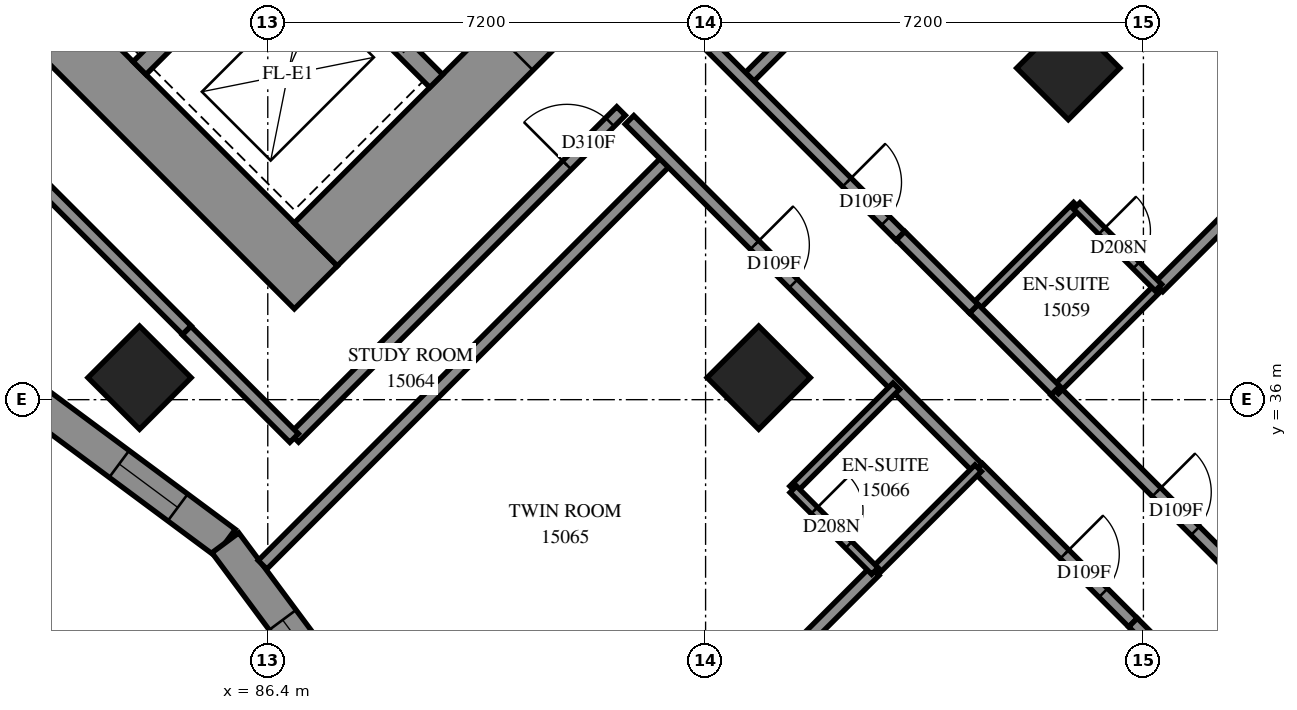
"""IFC4 building model, lengths in metres.
Left out: names, types, materials, properties, quantities, classifications, styles, units other than length and angle.
Written with IfcOpenShell. Run it as: python <this file> out.ifc"""

import sys

from ifc_helpers import new_model, si_unit, direction, frame, frame_2d, origin, origin_2d, place, context, subcontext, project, spatial, polyline, rectangle, outline, extrude, element, fill, save


model = new_model("IFC4")
c1 = context("Model", 3, precision=1e-05, world=origin(), true_north=direction((0.0, 1.0)))
c2 = subcontext(c1, "Body", "Model", "MODEL_VIEW")
j1 = project(units=[si_unit("LENGTHUNIT", "METRE"), si_unit("PLANEANGLEUNIT", "RADIAN")], contexts=[c1])
p1 = place(None, origin())
s1 = spatial("IfcSite", under=j1, at=p1, CompositionType="ELEMENT")
p2 = place(p1, origin())
s2 = spatial("IfcBuilding", under=s1, at=p2, CompositionType="ELEMENT")
p3 = place(p2, frame((0.0, 0.0, 57.6)))
s3 = spatial("IfcBuildingStorey", under=s2, at=p3, CompositionType="ELEMENT", Elevation=57.6)
for number, where, z_axis, x_axis in (
    (1, (84.291, 36.362, 0.0), (0.0, 0.0, 1.0), (0.707, -0.707, 0.0)),
    (2, (99.565, 41.453, 0.0), (0.0, 0.0, 1.0), (0.707, -0.707, 0.0)),
    (3, (94.474, 36.362, 0.0), (0.0, 0.0, 1.0), (0.707, -0.707, 0.0)),
):
    element("IfcColumn", number, at=place(p3, frame(where, z_axis=z_axis, x_axis=x_axis)), inside=s3, PredefinedType="COLUMN", context=c2, shape_type="SweptSolid", body=[
        extrude(rectangle(XDim=1.2, YDim=1.2, at=origin_2d()), origin(), (0.0, 0.0, 1.0), 3.1),
    ])
p4 = place(p3, frame((75.594, 49.443, -0.3), z_axis=(0.0, 0.0, 1.0), x_axis=(0.7071037324, -0.70710983, 0.0)))
e4 = element("IfcWall", 4, at=p4, inside=s3, PredefinedType="SHEAR", context=c2, shape_type="SweptSolid", body=[
    extrude(rectangle(XDim=16.4, YDim=1.0, at=frame_2d((8.2, 0.0))), origin(), (0.0, 0.0, 1.0), 2.7),
])
p5 = place(p3, frame((87.19, 38.554, -0.3), z_axis=(0.0, 0.0, 1.0), x_axis=(0.707103309, 0.7071102534, 0.0)))
e5 = element("IfcWall", 5, at=p5, inside=s3, PredefinedType="SHEAR", context=c2, shape_type="SweptSolid", body=[
    extrude(rectangle(XDim=14.4, YDim=1.0, at=frame_2d((7.2, 0.0))), origin(), (0.0, 0.0, 1.0), 2.7),
])
p6 = place(p5, frame((4.55, 0.0, 0.3)))
e6 = element("IfcOpeningElement", 6, at=p6, cuts=e5, PredefinedType="OPENING", context=c2, shape_type="SweptSolid", body=[
    extrude(rectangle(XDim=1.1, YDim=2.1, at=frame_2d((0.55, 1.05))), frame((0.0, 0.51, 0.0), z_axis=(0.0, -1.0, 0.0), x_axis=(1.0, 0.0, 0.0)), (0.0, 0.0, 1.0), 1.02),
])
p7 = place(p5, frame((11.35, 0.0, 0.3)))
e7 = element("IfcOpeningElement", 7, at=p7, cuts=e5, PredefinedType="OPENING", context=c2, shape_type="SweptSolid", body=[
    extrude(rectangle(XDim=1.1, YDim=2.1, at=frame_2d((0.55, 1.05))), frame((0.0, 0.51, 0.0), z_axis=(0.0, -1.0, 0.0), x_axis=(1.0, 0.0, 0.0)), (0.0, 0.0, 1.0), 1.02),
])
p8 = place(p3, frame((84.291, 41.453, 0.0), z_axis=(0.0, 0.0, 1.0), x_axis=(0.7071067812, 0.7071067812, 0.0)))
e8 = element("IfcWall", 8, at=p8, inside=s3, PredefinedType="SOLIDWALL", context=c2, shape_type="SweptSolid", body=[
    extrude(rectangle(XDim=3.3, YDim=0.3, at=frame_2d((1.65, 0.0))), origin(), (0.0, 0.0, 1.0), 3.1),
])
p9 = place(p3, frame((78.988, 51.423, 0.0), z_axis=(0.0, 0.0, 1.0), x_axis=(0.7071067812, -0.7071067812, 0.0)))
e9 = element("IfcWall", 9, at=p9, inside=s3, PredefinedType="SOLIDWALL", context=c2, shape_type="SweptSolid", body=[
    extrude(rectangle(XDim=14.4, YDim=0.3, at=frame_2d((7.2, 0.0))), origin(), (0.0, 0.0, 1.0), 3.1),
])
p10 = place(p9, frame((1.25, 0.0, 0.0)))
e10 = element("IfcOpeningElement", 10, at=p10, cuts=e9, PredefinedType="OPENING", context=c2, shape_type="SweptSolid", body=[
    extrude(rectangle(XDim=1.1, YDim=2.1, at=frame_2d((0.55, 1.05))), frame((0.0, 0.16, 0.0), z_axis=(0.0, -1.0, 0.0), x_axis=(1.0, 0.0, 0.0)), (0.0, 0.0, 1.0), 0.32),
])
p11 = place(p9, frame((4.85, 0.0, 0.0)))
e11 = element("IfcOpeningElement", 11, at=p11, cuts=e9, PredefinedType="OPENING", context=c2, shape_type="SweptSolid", body=[
    extrude(rectangle(XDim=1.1, YDim=2.1, at=frame_2d((0.55, 1.05))), frame((0.0, 0.16, 0.0), z_axis=(0.0, -1.0, 0.0), x_axis=(1.0, 0.0, 0.0)), (0.0, 0.0, 1.0), 0.32),
])
p12 = place(p9, frame((8.45, 0.0, 0.0)))
e12 = element("IfcOpeningElement", 12, at=p12, cuts=e9, PredefinedType="OPENING", context=c2, shape_type="SweptSolid", body=[
    extrude(rectangle(XDim=1.1, YDim=2.1, at=frame_2d((0.55, 1.05))), frame((0.0, 0.16, 0.0), z_axis=(0.0, -1.0, 0.0), x_axis=(1.0, 0.0, 0.0)), (0.0, 0.0, 1.0), 0.32),
])
p13 = place(p9, frame((12.05, 0.0, 0.0)))
e13 = element("IfcOpeningElement", 13, at=p13, cuts=e9, PredefinedType="OPENING", context=c2, shape_type="SweptSolid", body=[
    extrude(rectangle(XDim=1.1, YDim=2.1, at=frame_2d((0.55, 1.05))), frame((0.0, 0.16, 0.0), z_axis=(0.0, -1.0, 0.0), x_axis=(1.0, 0.0, 0.0)), (0.0, 0.0, 1.0), 0.32),
])
p14 = place(p3, frame((82.563, 35.977, 0.0), z_axis=(0.0, 0.0, 1.0), x_axis=(0.8029207709, -0.596085762, 0.0)))
e14 = element("IfcWall", 14, at=p14, inside=s3, PredefinedType="SOLIDWALL", context=c2, shape_type="SweptSolid", body=[
    extrude(outline(polyline([(-0.041, -0.275), (3.87, -0.275), (3.951, 0.275), (0.041, 0.275), (-0.041, -0.275)])), origin(), (0.0, 0.0, 1.0), 3.1),
])
p15 = place(p14, frame((1.736, 0.0, 0.5)))
e15 = element("IfcOpeningElement", 15, at=p15, cuts=e14, PredefinedType="OPENING", context=c2, shape_type="SweptSolid", body=[
    extrude(rectangle(XDim=1.2, YDim=2.45, at=frame_2d((0.6, 1.225))), frame((0.0, 0.285, 0.0), z_axis=(0.0, -1.0, 0.0), x_axis=(1.0, 0.0, 0.0)), (0.0, 0.0, 1.0), 0.57),
])
p16 = place(p3, frame((85.703, 33.646, 0.0), z_axis=(0.0, 0.0, 1.0), x_axis=(0.596085762, -0.8029207709, 0.0)))
e16 = element("IfcWall", 16, at=p16, inside=s3, PredefinedType="SOLIDWALL", context=c2, shape_type="SweptSolid", body=[
    extrude(outline(polyline([(0.041, -0.275), (3.951, -0.275), (3.87, 0.275), (-0.041, 0.275), (0.041, -0.275)])), origin(), (0.0, 0.0, 1.0), 3.1),
])
p17 = place(p16, frame((1.58, 0.0, 0.5)))
e17 = element("IfcOpeningElement", 17, at=p17, cuts=e16, PredefinedType="OPENING", context=c2, shape_type="SweptSolid", body=[
    extrude(rectangle(XDim=1.2, YDim=2.45, at=frame_2d((0.6, 1.225))), frame((0.0, 0.285, 0.0), z_axis=(0.0, -1.0, 0.0), x_axis=(1.0, 0.0, 0.0)), (0.0, 0.0, 1.0), 0.57),
])
p18 = place(p3, frame((94.259, 41.243, 0.0), z_axis=(0.0, 0.0, 1.0), x_axis=(0.7070203602, 0.7071931916, 0.0)))
e18 = element("IfcWall", 18, at=p18, inside=s3, PredefinedType="PARTITIONING", context=c2, shape_type="SweptSolid", body=[
    extrude(rectangle(XDim=12.151, YDim=0.2, at=frame_2d((6.075, 0.0))), origin(), (0.0, 0.0, 1.0), 3.1),
])
p19 = place(p3, frame((101.049, 37.847, 0.0), z_axis=(0.0, 0.0, 1.0), x_axis=(0.7071067812, 0.7071067812, 0.0)))
e19 = element("IfcWall", 19, at=p19, inside=s3, PredefinedType="PARTITIONING", context=c2, shape_type="SweptSolid", body=[
    extrude(rectangle(XDim=9.806, YDim=0.2, at=frame_2d((4.903, 0.0))), origin(), (0.0, 0.0, 1.0), 3.1),
])
p20 = place(p3, frame((86.314, 33.285, 0.0), z_axis=(0.0, 0.0, 1.0), x_axis=(0.7069956063, 0.7072179386, 0.0)))
e20 = element("IfcWall", 20, at=p20, inside=s3, PredefinedType="PARTITIONING", context=c2, shape_type="SweptSolid", body=[
    extrude(rectangle(XDim=9.445, YDim=0.2, at=frame_2d((4.723, 0.0))), origin(), (0.0, 0.0, 1.0), 3.1),
])
p21 = place(p3, frame((92.349, 40.601, 0.0), z_axis=(0.0, 0.0, 1.0), x_axis=(0.7071067812, -0.7071067812, 0.0)))
e21 = element("IfcWall", 21, at=p21, inside=s3, PredefinedType="PARTITIONING", context=c2, shape_type="SweptSolid", body=[
    extrude(rectangle(XDim=8.101, YDim=0.2, at=frame_2d((4.05, 0.0))), origin(), (0.0, 0.0, 1.0), 3.1),
])
p22 = place(p21, frame((2.909, 0.0, 0.0)))
e22 = element("IfcOpeningElement", 22, at=p22, cuts=e21, PredefinedType="OPENING", context=c2, shape_type="SweptSolid", body=[
    extrude(rectangle(XDim=0.9, YDim=2.1, at=frame_2d((0.45, 1.05))), frame((0.0, 0.11, 0.0), z_axis=(0.0, -1.0, 0.0), x_axis=(1.0, 0.0, 0.0)), (0.0, 0.0, 1.0), 0.22),
])
p23 = place(p3, frame((86.836, 35.372, 0.0), z_axis=(0.0, 0.0, 1.0), x_axis=(0.7071067812, 0.7071067812, 0.0)))
e23 = element("IfcWall", 23, at=p23, inside=s3, PredefinedType="PARTITIONING", context=c2, shape_type="SweptSolid", body=[
    extrude(rectangle(XDim=7.6, YDim=0.2, at=frame_2d((3.8, 0.0))), origin(), (0.0, 0.0, 1.0), 3.1),
])
p24 = place(p23, frame((6.342, 0.0, 0.0)))
e24 = element("IfcOpeningElement", 24, at=p24, cuts=e23, PredefinedType="OPENING", context=c2, shape_type="SweptSolid", body=[
    extrude(rectangle(XDim=1.0, YDim=2.1, at=frame_2d((0.5, 1.05))), frame((0.0, 0.11, 0.0), z_axis=(0.0, -1.0, 0.0), x_axis=(1.0, 0.0, 0.0)), (0.0, 0.0, 1.0), 0.22),
])
p25 = place(p3, frame((99.349, 36.147, 0.0), z_axis=(0.0, 0.0, 1.0), x_axis=(0.7071067812, -0.7071067812, 0.0)))
e25 = element("IfcWall", 25, at=p25, inside=s3, PredefinedType="PARTITIONING", context=c2, shape_type="SweptSolid", body=[
    extrude(rectangle(XDim=7.201, YDim=0.2, at=frame_2d((3.601, 0.0))), origin(), (0.0, 0.0, 1.0), 3.1),
])
p26 = place(p25, frame((2.358, 0.0, 0.0)))
e26 = element("IfcOpeningElement", 26, at=p26, cuts=e25, PredefinedType="OPENING", context=c2, shape_type="SweptSolid", body=[
    extrude(rectangle(XDim=0.9, YDim=2.1, at=frame_2d((0.45, 1.05))), frame((0.0, 0.11, 0.0), z_axis=(0.0, -1.0, 0.0), x_axis=(1.0, 0.0, 0.0)), (0.0, 0.0, 1.0), 0.22),
])
p27 = place(p3, frame((91.457, 28.256, 0.0), z_axis=(0.0, 0.0, 1.0), x_axis=(0.7071067812, 0.7071067812, 0.0)))
e27 = element("IfcWall", 27, at=p27, inside=s3, PredefinedType="PARTITIONING", context=c2, shape_type="SweptSolid", body=[
    extrude(rectangle(XDim=6.965, YDim=0.2, at=frame_2d((3.482, 0.0))), origin(), (0.0, 0.0, 1.0), 3.1),
])
p28 = place(p3, frame((85.07, 37.142, 0.0), z_axis=(0.0, 0.0, 1.0), x_axis=(-0.7070899851, 0.7071235769, 0.0)))
e28 = element("IfcWall", 28, at=p28, inside=s3, PredefinedType="PARTITIONING", context=c2, shape_type="SweptSolid", body=[
    extrude(rectangle(XDim=5.954, YDim=0.2, at=frame_2d((2.977, 0.0))), origin(), (0.0, 0.0, 1.0), 3.1),
])
p29 = place(p3, frame((93.481, 42.015, 0.0), z_axis=(0.0, 0.0, 1.0), x_axis=(0.7071067812, -0.7071067812, 0.0)))
e29 = element("IfcWall", 29, at=p29, inside=s3, PredefinedType="PARTITIONING", context=c2, shape_type="SweptSolid", body=[
    extrude(rectangle(XDim=4.698, YDim=0.2, at=frame_2d((2.349, 0.0))), origin(), (0.0, 0.0, 1.0), 3.1),
])
p30 = place(p29, frame((3.452, 0.0, 0.0)))
e30 = element("IfcOpeningElement", 30, at=p30, cuts=e29, PredefinedType="OPENING", context=c2, shape_type="SweptSolid", body=[
    extrude(rectangle(XDim=0.9, YDim=2.1, at=frame_2d((0.45, 1.05))), frame((0.0, 0.11, 0.0), z_axis=(0.0, -1.0, 0.0), x_axis=(1.0, 0.0, 0.0)), (0.0, 0.0, 1.0), 0.22),
])
p31 = place(p3, frame((98.082, 34.879, 0.0), z_axis=(0.0, 0.0, 1.0), x_axis=(0.7073845681, -0.7068288851, 0.0)))
e31 = element("IfcWall", 31, at=p31, inside=s3, PredefinedType="PARTITIONING", context=c2, shape_type="SweptSolid", body=[
    extrude(rectangle(XDim=3.599, YDim=0.2, at=frame_2d((1.8, 0.0))), origin(), (0.0, 0.0, 1.0), 3.1),
])
p32 = place(p31, frame((2.009, 0.0, 0.0)))
e32 = element("IfcOpeningElement", 32, at=p32, cuts=e31, PredefinedType="OPENING", context=c2, shape_type="SweptSolid", body=[
    extrude(rectangle(XDim=0.9, YDim=2.1, at=frame_2d((0.45, 1.05))), frame((0.0, 0.11, 0.0), z_axis=(0.0, -1.0, 0.0), x_axis=(1.0, 0.0, 0.0)), (0.0, 0.0, 1.0), 0.22),
])
p33 = place(p3, frame((85.065, 37.137, 0.0), z_axis=(0.0, 0.0, 1.0), x_axis=(0.7071067812, -0.7071067812, 0.0)))
e33 = element("IfcWall", 33, at=p33, inside=s3, PredefinedType="PARTITIONING", context=c2, shape_type="SweptSolid", body=[
    extrude(rectangle(XDim=2.5, YDim=0.2, at=frame_2d((1.25, 0.0))), origin(), (0.0, 0.0, 1.0), 3.1),
])
for number, where, z_axis, x_axis in (
    (34, (96.384, 33.178, 0.0), (0.0, 0.0, 1.0), (0.708, 0.707, 0.0)),
    (35, (99.349, 36.153, 0.0), (0.0, 0.0, 1.0), (0.708, 0.707, 0.0)),
):
    element("IfcWall", number, at=place(p3, frame(where, z_axis=z_axis, x_axis=x_axis)), inside=s3, PredefinedType="PARTITIONING", context=c2, shape_type="SweptSolid", body=[
        extrude(rectangle(XDim=2.4, YDim=0.15, at=frame_2d((1.2, 0.0))), origin(), (0.0, 0.0, 1.0), 3.1),
    ])
for number, where, z_axis, x_axis in (
    (36, (95.039, 34.525, 0.0), (0.0, 0.0, 1.0), (0.707, 0.707, 0.0)),
    (37, (98.009, 37.495, 0.0), (0.0, 0.0, 1.0), (0.707, 0.707, 0.0)),
):
    element("IfcWall", number, at=place(p3, frame(where, z_axis=z_axis, x_axis=x_axis)), inside=s3, PredefinedType="PARTITIONING", context=c2, shape_type="SweptSolid", body=[
        extrude(rectangle(XDim=2.398, YDim=0.15, at=frame_2d((1.199, 0.0))), origin(), (0.0, 0.0, 1.0), 3.1),
    ])
p34 = place(p3, frame((99.703, 39.187, 0.0), z_axis=(0.0, 0.0, 1.0), x_axis=(0.7071067812, -0.7071067812, 0.0)))
e38 = element("IfcWall", 38, at=p34, inside=s3, PredefinedType="PARTITIONING", context=c2, shape_type="SweptSolid", body=[
    extrude(rectangle(XDim=1.901, YDim=0.15, at=frame_2d((0.95, 0.0))), origin(), (0.0, 0.0, 1.0), 3.1),
])
p35 = place(p34, frame((0.584, 0.0, 0.0)))
e39 = element("IfcOpeningElement", 39, at=p35, cuts=e38, PredefinedType="OPENING", context=c2, shape_type="SweptSolid", body=[
    extrude(rectangle(XDim=0.8, YDim=2.1, at=frame_2d((0.4, 1.05))), frame((0.0, 0.085, 0.0), z_axis=(0.0, -1.0, 0.0), x_axis=(1.0, 0.0, 0.0)), (0.0, 0.0, 1.0), 0.17),
])
p36 = place(p3, frame((98.012, 37.496, 0.0), z_axis=(0.0, 0.0, 1.0), x_axis=(0.7065800724, -0.7076330979, 0.0)))
e40 = element("IfcWall", 40, at=p36, inside=s3, PredefinedType="PARTITIONING", context=c2, shape_type="SweptSolid", body=[
    extrude(rectangle(XDim=1.899, YDim=0.2, at=frame_2d((0.95, 0.0))), origin(), (0.0, 0.0, 1.0), 3.1),
])
p37 = place(p3, frame((95.042, 34.526, 0.0), z_axis=(0.0, 0.0, 1.0), x_axis=(0.7065800724, -0.7076330979, 0.0)))
e41 = element("IfcWall", 41, at=p37, inside=s3, PredefinedType="PARTITIONING", context=c2, shape_type="SweptSolid", body=[
    extrude(rectangle(XDim=1.899, YDim=0.15, at=frame_2d((0.95, 0.0))), origin(), (0.0, 0.0, 1.0), 3.1),
])
p38 = place(p37, frame((0.491, 0.0, 0.0)))
e42 = element("IfcOpeningElement", 42, at=p38, cuts=e41, PredefinedType="OPENING", context=c2, shape_type="SweptSolid", body=[
    extrude(rectangle(XDim=0.8, YDim=2.1, at=frame_2d((0.4, 1.05))), frame((0.0, 0.085, 0.0), z_axis=(0.0, -1.0, 0.0), x_axis=(1.0, 0.0, 0.0)), (0.0, 0.0, 1.0), 0.17),
])
p39 = place(p3, frame((96.806, 38.696, 0.0), z_axis=(0.0, 0.0, 1.0), x_axis=(0.7076943229, -0.7065187509, 0.0)))
e43 = element("IfcWall", 43, at=p39, inside=s3, PredefinedType="PARTITIONING", context=c2, shape_type="SweptSolid", body=[
    extrude(rectangle(XDim=1.701, YDim=0.2, at=frame_2d((0.851, 0.0))), origin(), (0.0, 0.0, 1.0), 3.1),
])
p40 = place(p3, frame((100.629, 32.335, 0.0), z_axis=(0.0, 0.0, 1.0), x_axis=(0.7071067812, -0.7071067812, 0.0)))
e44 = element("IfcWall", 44, at=p40, inside=s3, PredefinedType="PARTITIONING", context=c2, shape_type="SweptSolid", body=[
    extrude(rectangle(XDim=1.7, YDim=0.2, at=frame_2d((0.85, 0.0))), origin(), (0.0, 0.0, 1.0), 3.1),
])
p41 = place(p15, origin())
e45 = element("IfcWindow", 45, at=p41, inside=s3, PartitioningType="SINGLE_PANEL", PredefinedType="WINDOW", context=c2, shape_type="SweptSolid", body=[
    extrude(rectangle(XDim=1.2, YDim=2.45, at=frame_2d((0.6, 1.225))), frame((0.0, 0.155, 0.0), z_axis=(0.0, -1.0, 0.0), x_axis=(1.0, 0.0, 0.0)), (0.0, 0.0, 1.0), 0.06),
])
fill(e15, e45)
p42 = place(p17, origin())
e46 = element("IfcWindow", 46, at=p42, inside=s3, PartitioningType="SINGLE_PANEL", PredefinedType="WINDOW", context=c2, shape_type="SweptSolid", body=[
    extrude(rectangle(XDim=1.2, YDim=2.45, at=frame_2d((0.6, 1.225))), frame((0.0, 0.155, 0.0), z_axis=(0.0, -1.0, 0.0), x_axis=(1.0, 0.0, 0.0)), (0.0, 0.0, 1.0), 0.06),
])
fill(e17, e46)
p43 = place(p30, origin())
e47 = element("IfcDoor", 47, at=p43, inside=s3, OperationType="SINGLE_SWING_RIGHT", PredefinedType="DOOR", context=c2, shape_type="SweptSolid", body=[
    extrude(rectangle(XDim=0.9, YDim=2.1, at=frame_2d((0.45, 1.05))), frame((0.0, 0.025, 0.0), z_axis=(0.0, -1.0, 0.0), x_axis=(1.0, 0.0, 0.0)), (0.0, 0.0, 1.0), 0.05),
])
fill(e30, e47)
p44 = place(p35, origin())
e48 = element("IfcDoor", 48, at=p44, inside=s3, OperationType="SINGLE_SWING_RIGHT", PredefinedType="DOOR", context=c2, shape_type="SweptSolid", body=[
    extrude(rectangle(XDim=0.8, YDim=2.1, at=frame_2d((0.4, 1.05))), frame((0.0, 0.025, 0.0), z_axis=(0.0, -1.0, 0.0), x_axis=(1.0, 0.0, 0.0)), (0.0, 0.0, 1.0), 0.05),
])
fill(e39, e48)
p45 = place(p26, origin())
e49 = element("IfcDoor", 49, at=p45, inside=s3, OperationType="SINGLE_SWING_RIGHT", PredefinedType="DOOR", context=c2, shape_type="SweptSolid", body=[
    extrude(rectangle(XDim=0.9, YDim=2.1, at=frame_2d((0.45, 1.05))), frame((0.0, 0.025, 0.0), z_axis=(0.0, -1.0, 0.0), x_axis=(1.0, 0.0, 0.0)), (0.0, 0.0, 1.0), 0.05),
])
fill(e26, e49)
p46 = place(p24, origin())
e50 = element("IfcDoor", 50, at=p46, inside=s3, OperationType="SINGLE_SWING_RIGHT", PredefinedType="DOOR", context=c2, shape_type="SweptSolid", body=[
    extrude(rectangle(XDim=1.0, YDim=2.1, at=frame_2d((0.5, 1.05))), frame((0.0, 0.025, 0.0), z_axis=(0.0, -1.0, 0.0), x_axis=(1.0, 0.0, 0.0)), (0.0, 0.0, 1.0), 0.05),
])
fill(e24, e50)
p47 = place(p22, origin())
e51 = element("IfcDoor", 51, at=p47, inside=s3, OperationType="SINGLE_SWING_LEFT", PredefinedType="DOOR", context=c2, shape_type="SweptSolid", body=[
    extrude(rectangle(XDim=0.9, YDim=2.1, at=frame_2d((0.45, 1.05))), frame((0.0, 0.025, 0.0), z_axis=(0.0, -1.0, 0.0), x_axis=(1.0, 0.0, 0.0)), (0.0, 0.0, 1.0), 0.05),
])
fill(e22, e51)
p48 = place(p38, origin())
e52 = element("IfcDoor", 52, at=p48, inside=s3, OperationType="SINGLE_SWING_RIGHT", PredefinedType="DOOR", context=c2, shape_type="SweptSolid", body=[
    extrude(rectangle(XDim=0.8, YDim=2.1, at=frame_2d((0.4, 1.05))), frame((0.0, 0.025, 0.0), z_axis=(0.0, -1.0, 0.0), x_axis=(1.0, 0.0, 0.0)), (0.0, 0.0, 1.0), 0.05),
])
fill(e42, e52)
p49 = place(p32, origin())
e53 = element("IfcDoor", 53, at=p49, inside=s3, OperationType="SINGLE_SWING_LEFT", PredefinedType="DOOR", context=c2, shape_type="SweptSolid", body=[
    extrude(rectangle(XDim=0.9, YDim=2.1, at=frame_2d((0.45, 1.05))), frame((0.0, 0.025, 0.0), z_axis=(0.0, -1.0, 0.0), x_axis=(1.0, 0.0, 0.0)), (0.0, 0.0, 1.0), 0.05),
])
fill(e32, e53)
save(model, sys.argv[1])
